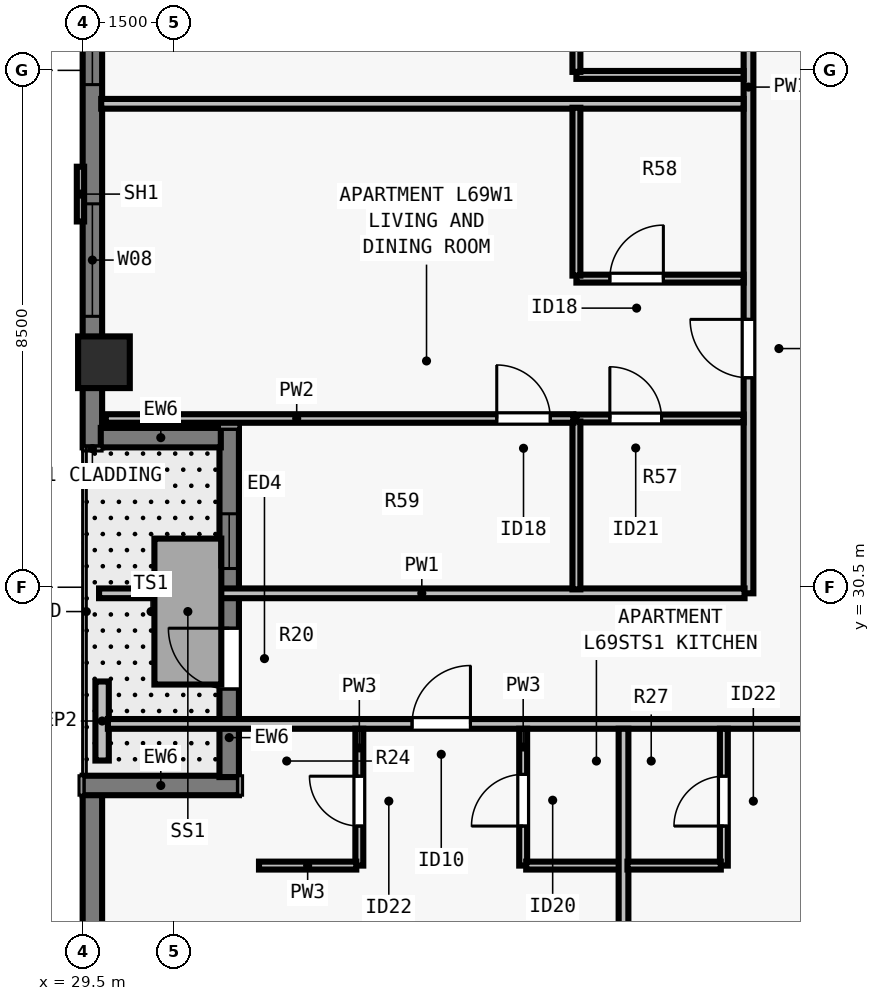
"""IFC4 building model, lengths in metres.
Left out: names, types, materials, properties, quantities, classifications, styles, units other than length and angle.
Written with IfcOpenShell. Run it as: python <this file> out.ifc"""

import sys

from ifc_helpers import new_model, si_unit, direction, frame, frame_2d, origin, origin_2d, place, context, subcontext, project, spatial, rectangle, extrude, element, fill, save


model = new_model("IFC4")
c1 = context("Model", 3, precision=1e-05, world=origin(), true_north=direction((0.0, 1.0)))
c2 = subcontext(c1, "Body", "Model", "MODEL_VIEW")
j1 = project(units=[si_unit("LENGTHUNIT", "METRE"), si_unit("PLANEANGLEUNIT", "RADIAN")], contexts=[c1])
p1 = place(None, origin())
s1 = spatial("IfcSite", under=j1, at=p1, CompositionType="ELEMENT")
p2 = place(p1, origin())
s2 = spatial("IfcBuilding", under=s1, at=p2, CompositionType="ELEMENT")
p3 = place(p2, frame((0.0, 0.0, 251.5)))
s3 = spatial("IfcBuildingStorey", under=s2, at=p3, CompositionType="ELEMENT", Elevation=251.5)
p4 = place(p3, frame((29.85, 34.2, 0.0), z_axis=(0.0, 0.0, 1.0), x_axis=(0.0, 1.0, 0.0)))
e1 = element("IfcColumn", 1, at=p4, inside=s3, PredefinedType="COLUMN", context=c2, shape_type="SweptSolid", body=[
    extrude(rectangle(XDim=0.85, YDim=0.85, at=origin_2d()), origin(), (0.0, 0.0, 1.0), 3.5),
])
p5 = place(p3, frame((29.66, 32.8, 0.0), z_axis=(0.0, 0.0, 1.0), x_axis=(0.0, 1.0, 0.0)))
e2 = element("IfcWall", 2, at=p5, inside=s3, PredefinedType="SOLIDWALL", context=c2, shape_type="SweptSolid", body=[
    extrude(rectangle(XDim=23.402, YDim=0.32, at=frame_2d((11.701, 0.0))), origin(), (0.0, 0.0, 1.0), 3.29),
])
p6 = place(p5, frame((2.155, 0.0, 0.8)))
e3 = element("IfcOpeningElement", 3, at=p6, cuts=e2, PredefinedType="OPENING", context=c2, shape_type="SweptSolid", body=[
    extrude(rectangle(XDim=1.85, YDim=1.678, at=frame_2d((0.925, 0.839))), frame((0.0, 0.17, 0.0), z_axis=(0.0, -1.0, 0.0), x_axis=(1.0, 0.0, 0.0)), (0.0, 0.0, 1.0), 0.34),
])
p7 = place(p5, frame((5.966, 0.0, 0.8)))
e4 = element("IfcOpeningElement", 4, at=p7, cuts=e2, PredefinedType="OPENING", context=c2, shape_type="SweptSolid", body=[
    extrude(rectangle(XDim=1.55, YDim=1.678, at=frame_2d((0.775, 0.839))), frame((0.0, 0.17, 0.0), z_axis=(0.0, -1.0, 0.0), x_axis=(1.0, 0.0, 0.0)), (0.0, 0.0, 1.0), 0.34),
])
p8 = place(p5, frame((12.836, 0.0, 0.8)))
e5 = element("IfcOpeningElement", 5, at=p8, cuts=e2, PredefinedType="OPENING", context=c2, shape_type="SweptSolid", body=[
    extrude(rectangle(XDim=1.55, YDim=1.678, at=frame_2d((0.775, 0.839))), frame((0.0, 0.17, 0.0), z_axis=(0.0, -1.0, 0.0), x_axis=(1.0, 0.0, 0.0)), (0.0, 0.0, 1.0), 0.34),
])
p9 = place(p5, frame((19.67, 0.0, 0.8)))
e6 = element("IfcOpeningElement", 6, at=p9, cuts=e2, PredefinedType="OPENING", context=c2, shape_type="SweptSolid", body=[
    extrude(rectangle(XDim=0.9, YDim=1.678, at=frame_2d((0.45, 0.839))), frame((0.0, 0.17, 0.0), z_axis=(0.0, -1.0, 0.0), x_axis=(1.0, 0.0, 0.0)), (0.0, 0.0, 1.0), 0.34),
])
p10 = place(p3, frame((29.66, 21.5, 0.0), z_axis=(0.0, 0.0, 1.0), x_axis=(0.0, 1.0, 0.0)))
e7 = element("IfcWall", 7, at=p10, inside=s3, PredefinedType="SOLIDWALL", context=c2, shape_type="SweptSolid", body=[
    extrude(rectangle(XDim=5.602, YDim=0.32, at=frame_2d((2.801, 0.0))), origin(), (0.0, 0.0, 1.0), 3.29),
])
p11 = place(p3, frame((29.5, 27.24, 0.0), z_axis=(0.0, 0.0, 1.0), x_axis=(1.0, 0.0, 0.0)))
e8 = element("IfcWall", 8, at=p11, inside=s3, PredefinedType="SOLIDWALL", context=c2, shape_type="SweptSolid", body=[
    extrude(rectangle(XDim=2.57, YDim=0.32, at=frame_2d((1.285, 0.0))), origin(), (0.0, 0.0, 1.0), 3.29),
])
p12 = place(p3, frame((31.91, 27.378, 0.0), z_axis=(0.0, 0.0, 1.0), x_axis=(0.0, 1.0, 0.0)))
e9 = element("IfcWall", 9, at=p12, inside=s3, PredefinedType="SOLIDWALL", context=c2, shape_type="SweptSolid", body=[
    extrude(rectangle(XDim=5.742, YDim=0.32, at=frame_2d((2.871, 0.0))), origin(), (0.0, 0.0, 1.0), 3.29),
])
p13 = place(p12, frame((1.448, 0.0, 0.0)))
e10 = element("IfcOpeningElement", 10, at=p13, cuts=e9, PredefinedType="OPENING", context=c2, shape_type="SweptSolid", body=[
    extrude(rectangle(XDim=1.0, YDim=2.15, at=frame_2d((0.5, 1.075))), frame((0.0, 0.17, 0.0), z_axis=(0.0, -1.0, 0.0), x_axis=(1.0, 0.0, 0.0)), (0.0, 0.0, 1.0), 0.34),
])
p14 = place(p12, frame((3.43, 0.0, 0.8)))
e11 = element("IfcOpeningElement", 11, at=p14, cuts=e9, PredefinedType="OPENING", context=c2, shape_type="SweptSolid", body=[
    extrude(rectangle(XDim=0.9, YDim=1.678, at=frame_2d((0.45, 0.839))), frame((0.0, 0.17, 0.0), z_axis=(0.0, -1.0, 0.0), x_axis=(1.0, 0.0, 0.0)), (0.0, 0.0, 1.0), 0.34),
])
p15 = place(p3, frame((31.772, 32.96, 0.0), z_axis=(0.0, 0.0, 1.0), x_axis=(-1.0, 0.0, 0.0)))
e12 = element("IfcWall", 12, at=p15, inside=s3, PredefinedType="SOLIDWALL", context=c2, shape_type="SweptSolid", body=[
    extrude(rectangle(XDim=1.974, YDim=0.32, at=frame_2d((0.987, 0.0))), origin(), (0.0, 0.0, 1.0), 3.29),
])
p16 = place(p3, frame((29.82, 27.65, 0.0), z_axis=(0.0, 0.0, 1.0), x_axis=(0.0, 1.0, 0.0)))
e13 = element("IfcWall", 13, at=p16, inside=s3, PredefinedType="PARAPET", context=c2, shape_type="SweptSolid", body=[
    extrude(rectangle(XDim=1.3, YDim=0.22, at=frame_2d((0.65, 0.0))), origin(), (0.0, 0.0, 1.0), 0.55),
])
p17 = place(p3, frame((29.915, 28.252, 0.0), z_axis=(0.0, 0.0, 1.0), x_axis=(1.0, 0.0, 0.0)))
e14 = element("IfcWall", 14, at=p17, inside=s3, PredefinedType="PARTITIONING", context=c2, shape_type="SweptSolid", body=[
    extrude(rectangle(XDim=44.28, YDim=0.16, at=frame_2d((22.14, 0.0))), origin(), (0.0, 0.0, 1.0), 2.958),
])
p18 = place(p17, frame((5.002, 0.0, 0.0)))
e15 = element("IfcOpeningElement", 15, at=p18, cuts=e14, PredefinedType="OPENING", context=c2, shape_type="SweptSolid", body=[
    extrude(rectangle(XDim=0.96, YDim=2.18, at=frame_2d((0.48, 1.09))), frame((0.0, 0.09, 0.0), z_axis=(0.0, -1.0, 0.0), x_axis=(1.0, 0.0, 0.0)), (0.0, 0.0, 1.0), 0.18),
])
p19 = place(p17, frame((12.718, 0.0, 0.0)))
e16 = element("IfcOpeningElement", 16, at=p19, cuts=e14, PredefinedType="OPENING", context=c2, shape_type="SweptSolid", body=[
    extrude(rectangle(XDim=0.96, YDim=2.18, at=frame_2d((0.48, 1.09))), frame((0.0, 0.09, 0.0), z_axis=(0.0, -1.0, 0.0), x_axis=(1.0, 0.0, 0.0)), (0.0, 0.0, 1.0), 0.18),
])
p20 = place(p17, frame((21.55, 0.0, 0.0)))
e17 = element("IfcOpeningElement", 17, at=p20, cuts=e14, PredefinedType="OPENING", context=c2, shape_type="SweptSolid", body=[
    extrude(rectangle(XDim=0.96, YDim=2.18, at=frame_2d((0.48, 1.09))), frame((0.0, 0.09, 0.0), z_axis=(0.0, -1.0, 0.0), x_axis=(1.0, 0.0, 0.0)), (0.0, 0.0, 1.0), 0.18),
])
p21 = place(p17, frame((30.382, 0.0, 0.0)))
e18 = element("IfcOpeningElement", 18, at=p21, cuts=e14, PredefinedType="OPENING", context=c2, shape_type="SweptSolid", body=[
    extrude(rectangle(XDim=0.96, YDim=2.18, at=frame_2d((0.48, 1.09))), frame((0.0, 0.09, 0.0), z_axis=(0.0, -1.0, 0.0), x_axis=(1.0, 0.0, 0.0)), (0.0, 0.0, 1.0), 0.18),
])
p22 = place(p17, frame((39.393, 0.0, 0.0)))
e19 = element("IfcOpeningElement", 19, at=p22, cuts=e14, PredefinedType="OPENING", context=c2, shape_type="SweptSolid", body=[
    extrude(rectangle(XDim=0.96, YDim=2.18, at=frame_2d((0.48, 1.09))), frame((0.0, 0.09, 0.0), z_axis=(0.0, -1.0, 0.0), x_axis=(1.0, 0.0, 0.0)), (0.0, 0.0, 1.0), 0.18),
])
p23 = place(p3, frame((40.45, 30.4, 0.0), z_axis=(0.0, 0.0, 1.0), x_axis=(0.0, 1.0, 0.0)))
e20 = element("IfcWall", 20, at=p23, inside=s3, PredefinedType="PARTITIONING", context=c2, shape_type="SweptSolid", body=[
    extrude(rectangle(XDim=17.2, YDim=0.16, at=frame_2d((8.6, 0.0))), origin(), (0.0, 0.0, 1.0), 3.29),
])
p24 = place(p23, frame((3.545, 0.0, 0.0)))
e21 = element("IfcOpeningElement", 21, at=p24, cuts=e20, PredefinedType="OPENING", context=c2, shape_type="SweptSolid", body=[
    extrude(rectangle(XDim=0.96, YDim=2.18, at=frame_2d((0.48, 1.09))), frame((0.0, 0.09, 0.0), z_axis=(0.0, -1.0, 0.0), x_axis=(1.0, 0.0, 0.0)), (0.0, 0.0, 1.0), 0.18),
])
p25 = place(p23, frame((12.145, 0.0, 0.0)))
e22 = element("IfcOpeningElement", 22, at=p25, cuts=e20, PredefinedType="OPENING", context=c2, shape_type="SweptSolid", body=[
    extrude(rectangle(XDim=0.96, YDim=2.18, at=frame_2d((0.48, 1.09))), frame((0.0, 0.09, 0.0), z_axis=(0.0, -1.0, 0.0), x_axis=(1.0, 0.0, 0.0)), (0.0, 0.0, 1.0), 0.18),
])
p26 = place(p3, frame((29.77, 30.4, 0.0), z_axis=(0.0, 0.0, 1.0), x_axis=(1.0, 0.0, 0.0)))
e23 = element("IfcWall", 23, at=p26, inside=s3, PredefinedType="PARTITIONING", context=c2, shape_type="SweptSolid", body=[
    extrude(rectangle(XDim=10.615, YDim=0.16, at=frame_2d((5.308, 0.0))), origin(), (0.0, 0.0, 1.0), 3.29),
])
p27 = place(p3, frame((34.05, 25.923, 0.0), z_axis=(0.0, 0.0, 1.0), x_axis=(0.0, 1.0, 0.0)))
e24 = element("IfcWall", 24, at=p27, inside=s3, PredefinedType="PLUMBINGWALL", context=c2, shape_type="SweptSolid", body=[
    extrude(rectangle(XDim=2.25, YDim=0.13, at=frame_2d((1.125, 0.0))), origin(), (0.0, 0.0, 1.0), 3.29),
])
p28 = place(p27, frame((0.65, 0.0, 0.0)))
e25 = element("IfcOpeningElement", 25, at=p28, cuts=e24, PredefinedType="OPENING", context=c2, shape_type="SweptSolid", body=[
    extrude(rectangle(XDim=0.82, YDim=2.1, at=frame_2d((0.41, 1.05))), frame((0.0, 0.075, 0.0), z_axis=(0.0, -1.0, 0.0), x_axis=(1.0, 0.0, 0.0)), (0.0, 0.0, 1.0), 0.15),
])
p29 = place(p3, frame((32.4, 25.923, 0.0), z_axis=(0.0, 0.0, 1.0), x_axis=(1.0, 0.0, 0.0)))
e26 = element("IfcWall", 26, at=p29, inside=s3, PredefinedType="PLUMBINGWALL", context=c2, shape_type="SweptSolid", body=[
    extrude(rectangle(XDim=1.6, YDim=0.13, at=frame_2d((0.8, 0.0))), origin(), (0.0, 0.0, 1.0), 3.29),
])
p30 = place(p3, frame((36.744, 25.923, 0.0), z_axis=(0.0, 0.0, 1.0), x_axis=(0.0, 1.0, 0.0)))
e27 = element("IfcWall", 27, at=p30, inside=s3, PredefinedType="PLUMBINGWALL", context=c2, shape_type="SweptSolid", body=[
    extrude(rectangle(XDim=2.25, YDim=0.13, at=frame_2d((1.125, 0.0))), origin(), (0.0, 0.0, 1.0), 3.29),
])
p31 = place(p30, frame((0.65, 0.0, 0.0)))
e28 = element("IfcOpeningElement", 28, at=p31, cuts=e27, PredefinedType="OPENING", context=c2, shape_type="SweptSolid", body=[
    extrude(rectangle(XDim=0.85, YDim=2.1, at=frame_2d((0.425, 1.05))), frame((0.0, 0.075, 0.0), z_axis=(0.0, -1.0, 0.0), x_axis=(1.0, 0.0, 0.0)), (0.0, 0.0, 1.0), 0.15),
])
p32 = place(p3, frame((36.794, 25.923, 0.0), z_axis=(0.0, 0.0, 1.0), x_axis=(1.0, 0.0, 0.0)))
e29 = element("IfcWall", 29, at=p32, inside=s3, PredefinedType="PLUMBINGWALL", context=c2, shape_type="SweptSolid", body=[
    extrude(rectangle(XDim=1.6, YDim=0.13, at=frame_2d((0.8, 0.0))), origin(), (0.0, 0.0, 1.0), 3.29),
])
p33 = place(p3, frame((38.395, 16.805, 0.0), z_axis=(0.0, 0.0, 1.0), x_axis=(0.0, 1.0, 0.0)))
e30 = element("IfcWall", 30, at=p33, inside=s3, PredefinedType="PARTITIONING", context=c2, shape_type="SweptSolid", body=[
    extrude(rectangle(XDim=11.368, YDim=0.16, at=frame_2d((5.684, 0.0))), origin(), (0.0, 0.0, 1.0), 2.573),
])
p34 = place(p3, frame((40.044, 25.923, 0.0), z_axis=(0.0, 0.0, 1.0), x_axis=(0.0, 1.0, 0.0)))
e31 = element("IfcWall", 31, at=p34, inside=s3, PredefinedType="PLUMBINGWALL", context=c2, shape_type="SweptSolid", body=[
    extrude(rectangle(XDim=2.25, YDim=0.13, at=frame_2d((1.125, 0.0))), origin(), (0.0, 0.0, 1.0), 3.29),
])
p35 = place(p34, frame((0.65, 0.0, 0.0)))
e32 = element("IfcOpeningElement", 32, at=p35, cuts=e31, PredefinedType="OPENING", context=c2, shape_type="SweptSolid", body=[
    extrude(rectangle(XDim=0.82, YDim=2.1, at=frame_2d((0.41, 1.05))), frame((0.0, 0.075, 0.0), z_axis=(0.0, -1.0, 0.0), x_axis=(1.0, 0.0, 0.0)), (0.0, 0.0, 1.0), 0.15),
])
p36 = place(p3, frame((38.459, 25.923, 0.0), z_axis=(0.0, 0.0, 1.0), x_axis=(1.0, 0.0, 0.0)))
e33 = element("IfcWall", 33, at=p36, inside=s3, PredefinedType="PLUMBINGWALL", context=c2, shape_type="SweptSolid", body=[
    extrude(rectangle(XDim=1.535, YDim=0.13, at=frame_2d((0.768, 0.0))), origin(), (0.0, 0.0, 1.0), 3.29),
])
p37 = place(p3, frame((29.805, 38.45, 0.0), z_axis=(0.0, 0.0, 1.0), x_axis=(1.0, 0.0, 0.0)))
e34 = element("IfcWall", 34, at=p37, inside=s3, PredefinedType="PARTITIONING", context=c2, shape_type="SweptSolid", body=[
    extrude(rectangle(XDim=10.565, YDim=0.16, at=frame_2d((5.283, 0.0))), origin(), (0.0, 0.0, 1.0), 2.958),
])
p38 = place(p3, frame((37.62, 33.275, 0.0), z_axis=(0.0, 0.0, 1.0), x_axis=(1.0, 0.0, 0.0)))
e35 = element("IfcWall", 35, at=p38, inside=s3, PredefinedType="PLUMBINGWALL", context=c2, shape_type="SweptSolid", body=[
    extrude(rectangle(XDim=2.75, YDim=0.13, at=frame_2d((1.375, 0.0))), origin(), (0.0, 0.0, 1.0), 3.29),
])
p39 = place(p38, frame((0.55, 0.0, 0.0)))
e36 = element("IfcOpeningElement", 36, at=p39, cuts=e35, PredefinedType="OPENING", context=c2, shape_type="SweptSolid", body=[
    extrude(rectangle(XDim=0.85, YDim=2.08, at=frame_2d((0.425, 1.04))), frame((0.0, 0.075, 0.0), z_axis=(0.0, -1.0, 0.0), x_axis=(1.0, 0.0, 0.0)), (0.0, 0.0, 1.0), 0.15),
])
p40 = place(p3, frame((37.62, 30.465, 0.0), z_axis=(0.0, 0.0, 1.0), x_axis=(0.0, 1.0, 0.0)))
e37 = element("IfcWall", 37, at=p40, inside=s3, PredefinedType="PLUMBINGWALL", context=c2, shape_type="SweptSolid", body=[
    extrude(rectangle(XDim=2.76, YDim=0.13, at=frame_2d((1.38, 0.0))), origin(), (0.0, 0.0, 1.0), 3.29),
])
p41 = place(p3, frame((37.62, 35.575, 0.0), z_axis=(0.0, 0.0, 1.0), x_axis=(1.0, 0.0, 0.0)))
e38 = element("IfcWall", 38, at=p41, inside=s3, PredefinedType="PLUMBINGWALL", context=c2, shape_type="SweptSolid", body=[
    extrude(rectangle(XDim=2.75, YDim=0.13, at=frame_2d((1.375, 0.0))), origin(), (0.0, 0.0, 1.0), 3.29),
])
p42 = place(p41, frame((0.55, 0.0, 0.0)))
e39 = element("IfcOpeningElement", 39, at=p42, cuts=e38, PredefinedType="OPENING", context=c2, shape_type="SweptSolid", body=[
    extrude(rectangle(XDim=0.88, YDim=2.1, at=frame_2d((0.44, 1.05))), frame((0.0, 0.075, 0.0), z_axis=(0.0, -1.0, 0.0), x_axis=(1.0, 0.0, 0.0)), (0.0, 0.0, 1.0), 0.15),
])
p43 = place(p3, frame((37.62, 35.625, 0.0), z_axis=(0.0, 0.0, 1.0), x_axis=(0.0, 1.0, 0.0)))
e40 = element("IfcWall", 40, at=p43, inside=s3, PredefinedType="PLUMBINGWALL", context=c2, shape_type="SweptSolid", body=[
    extrude(rectangle(XDim=2.76, YDim=0.13, at=frame_2d((1.38, 0.0))), origin(), (0.0, 0.0, 1.0), 3.29),
])
p44 = place(p3, frame((29.88, 33.275, 0.0), z_axis=(0.0, 0.0, 1.0), x_axis=(1.0, 0.0, 0.0)))
e41 = element("IfcWall", 41, at=p44, inside=s3, PredefinedType="PARTITIONING", context=c2, shape_type="SweptSolid", body=[
    extrude(rectangle(XDim=7.69, YDim=0.14, at=frame_2d((3.845, 0.0))), origin(), (0.0, 0.0, 1.0), 2.573),
])
p45 = place(p44, frame((6.43, 0.0, 0.0)))
e42 = element("IfcOpeningElement", 42, at=p45, cuts=e41, PredefinedType="OPENING", context=c2, shape_type="SweptSolid", body=[
    extrude(rectangle(XDim=0.88, YDim=2.1, at=frame_2d((0.44, 1.05))), frame((0.0, 0.08, 0.0), z_axis=(0.0, -1.0, 0.0), x_axis=(1.0, 0.0, 0.0)), (0.0, 0.0, 1.0), 0.16),
])
p46 = place(p3, frame((37.62, 38.925, 0.0), z_axis=(0.0, 0.0, 1.0), x_axis=(1.0, 0.0, 0.0)))
e43 = element("IfcWall", 43, at=p46, inside=s3, PredefinedType="PLUMBINGWALL", context=c2, shape_type="SweptSolid", body=[
    extrude(rectangle(XDim=2.75, YDim=0.13, at=frame_2d((1.375, 0.0))), origin(), (0.0, 0.0, 1.0), 3.29),
])
p47 = place(p3, frame((37.62, 38.975, 0.0), z_axis=(0.0, 0.0, 1.0), x_axis=(0.0, 1.0, 0.0)))
e44 = element("IfcWall", 44, at=p47, inside=s3, PredefinedType="PLUMBINGWALL", context=c2, shape_type="SweptSolid", body=[
    extrude(rectangle(XDim=2.85, YDim=0.13, at=frame_2d((1.425, 0.0))), origin(), (0.0, 0.0, 1.0), 3.29),
])
p48 = place(p6, origin())
e45 = element("IfcWindow", 45, at=p48, inside=s3, PartitioningType="SINGLE_PANEL", PredefinedType="WINDOW", context=c2, shape_type="SweptSolid", body=[
    extrude(rectangle(XDim=1.85, YDim=1.678, at=frame_2d((0.925, 0.839))), frame((0.0, -0.05, 0.0), z_axis=(0.0, -1.0, 0.0), x_axis=(1.0, 0.0, 0.0)), (0.0, 0.0, 1.0), 0.06),
])
fill(e3, e45)
p49 = place(p7, origin())
e46 = element("IfcWindow", 46, at=p49, inside=s3, PartitioningType="SINGLE_PANEL", PredefinedType="WINDOW", context=c2, shape_type="SweptSolid", body=[
    extrude(rectangle(XDim=1.55, YDim=1.678, at=frame_2d((0.775, 0.839))), frame((0.0, -0.05, 0.0), z_axis=(0.0, -1.0, 0.0), x_axis=(1.0, 0.0, 0.0)), (0.0, 0.0, 1.0), 0.06),
])
fill(e4, e46)
p50 = place(p13, origin())
e47 = element("IfcDoor", 47, at=p50, inside=s3, OperationType="SINGLE_SWING_RIGHT", PredefinedType="DOOR", context=c2, shape_type="SweptSolid", body=[
    extrude(rectangle(XDim=1.0, YDim=2.15, at=frame_2d((0.5, 1.075))), frame((0.0, 0.025, 0.0), z_axis=(0.0, -1.0, 0.0), x_axis=(1.0, 0.0, 0.0)), (0.0, 0.0, 1.0), 0.05),
])
fill(e10, e47)
p51 = place(p14, origin())
e48 = element("IfcWindow", 48, at=p51, inside=s3, PartitioningType="SINGLE_PANEL", PredefinedType="WINDOW", context=c2, shape_type="SweptSolid", body=[
    extrude(rectangle(XDim=0.9, YDim=1.678, at=frame_2d((0.45, 0.839))), frame((0.0, -0.04, 0.0), z_axis=(0.0, -1.0, 0.0), x_axis=(1.0, 0.0, 0.0)), (0.0, 0.0, 1.0), 0.06),
])
fill(e11, e48)
p52 = place(p28, origin())
e49 = element("IfcDoor", 49, at=p52, inside=s3, OperationType="SINGLE_SWING_RIGHT", PredefinedType="DOOR", context=c2, shape_type="SweptSolid", body=[
    extrude(rectangle(XDim=0.82, YDim=2.1, at=frame_2d((0.41, 1.05))), frame((0.0, 0.025, 0.0), z_axis=(0.0, -1.0, 0.0), x_axis=(1.0, 0.0, 0.0)), (0.0, 0.0, 1.0), 0.05),
])
fill(e25, e49)
p53 = place(p31, origin())
e50 = element("IfcDoor", 50, at=p53, inside=s3, OperationType="SINGLE_SWING_LEFT", PredefinedType="DOOR", context=c2, shape_type="SweptSolid", body=[
    extrude(rectangle(XDim=0.85, YDim=2.1, at=frame_2d((0.425, 1.05))), frame((0.0, 0.025, 0.0), z_axis=(0.0, -1.0, 0.0), x_axis=(1.0, 0.0, 0.0)), (0.0, 0.0, 1.0), 0.05),
])
fill(e28, e50)
p54 = place(p18, origin())
e51 = element("IfcDoor", 51, at=p54, inside=s3, OperationType="SINGLE_SWING_RIGHT", PredefinedType="DOOR", context=c2, shape_type="SweptSolid", body=[
    extrude(rectangle(XDim=0.96, YDim=2.18, at=frame_2d((0.48, 1.09))), frame((0.0, 0.025, 0.0), z_axis=(0.0, -1.0, 0.0), x_axis=(1.0, 0.0, 0.0)), (0.0, 0.0, 1.0), 0.05),
])
fill(e15, e51)
p55 = place(p35, origin())
e52 = element("IfcDoor", 52, at=p55, inside=s3, OperationType="SINGLE_SWING_LEFT", PredefinedType="DOOR", context=c2, shape_type="SweptSolid", body=[
    extrude(rectangle(XDim=0.82, YDim=2.1, at=frame_2d((0.41, 1.05))), frame((0.0, 0.025, 0.0), z_axis=(0.0, -1.0, 0.0), x_axis=(1.0, 0.0, 0.0)), (0.0, 0.0, 1.0), 0.05),
])
fill(e32, e52)
p56 = place(p39, origin())
e53 = element("IfcDoor", 53, at=p56, inside=s3, OperationType="SINGLE_SWING_LEFT", PredefinedType="DOOR", context=c2, shape_type="SweptSolid", body=[
    extrude(rectangle(XDim=0.85, YDim=2.08, at=frame_2d((0.425, 1.04))), frame((0.0, 0.025, 0.0), z_axis=(0.0, -1.0, 0.0), x_axis=(1.0, 0.0, 0.0)), (0.0, 0.0, 1.0), 0.05),
])
fill(e36, e53)
p57 = place(p42, origin())
e54 = element("IfcDoor", 54, at=p57, inside=s3, OperationType="SINGLE_SWING_RIGHT", PredefinedType="DOOR", context=c2, shape_type="SweptSolid", body=[
    extrude(rectangle(XDim=0.88, YDim=2.1, at=frame_2d((0.44, 1.05))), frame((0.0, 0.025, 0.0), z_axis=(0.0, -1.0, 0.0), x_axis=(1.0, 0.0, 0.0)), (0.0, 0.0, 1.0), 0.05),
])
fill(e39, e54)
p58 = place(p45, origin())
e55 = element("IfcDoor", 55, at=p58, inside=s3, OperationType="SINGLE_SWING_LEFT", PredefinedType="DOOR", context=c2, shape_type="SweptSolid", body=[
    extrude(rectangle(XDim=0.88, YDim=2.1, at=frame_2d((0.44, 1.05))), frame((0.0, 0.025, 0.0), z_axis=(0.0, -1.0, 0.0), x_axis=(1.0, 0.0, 0.0)), (0.0, 0.0, 1.0), 0.05),
])
fill(e42, e55)
p59 = place(p24, origin())
e56 = element("IfcDoor", 56, at=p59, inside=s3, OperationType="SINGLE_SWING_RIGHT", PredefinedType="DOOR", context=c2, shape_type="SweptSolid", body=[
    extrude(rectangle(XDim=0.96, YDim=2.18, at=frame_2d((0.48, 1.09))), frame((0.0, 0.025, 0.0), z_axis=(0.0, -1.0, 0.0), x_axis=(1.0, 0.0, 0.0)), (0.0, 0.0, 1.0), 0.05),
])
fill(e21, e56)
save(model, sys.argv[1])
